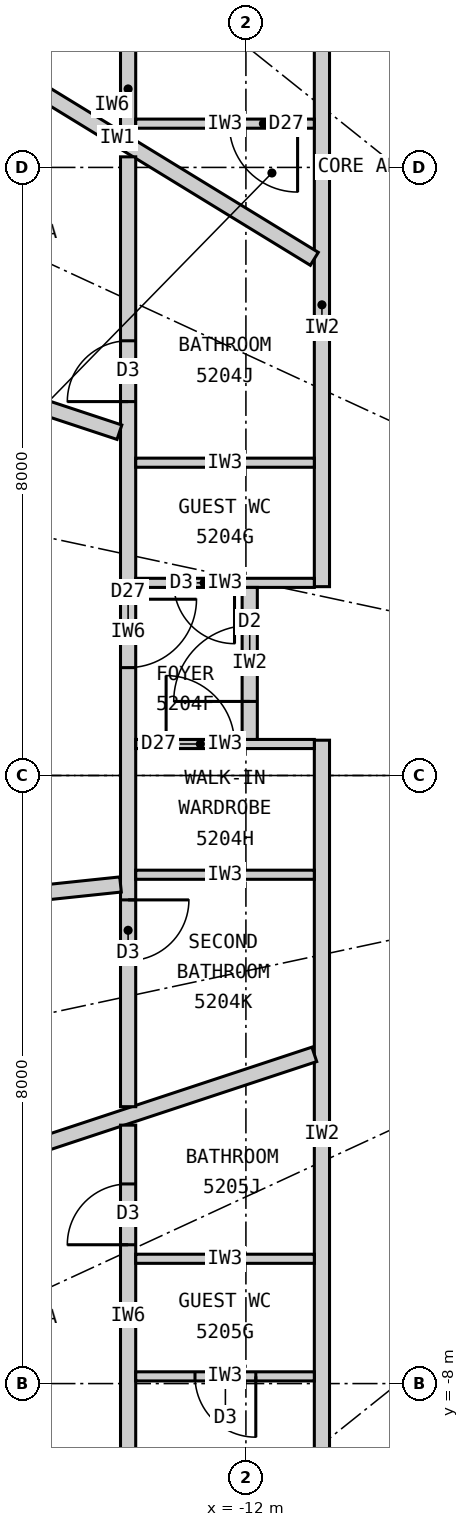
"""IFC4 building model, lengths in metres.
Left out: names, types, materials, properties, quantities, classifications, styles, units other than length and angle.
Written with IfcOpenShell. Run it as: python <this file> out.ifc"""

import sys

from ifc_helpers import new_model, si_unit, direction, frame, frame_2d, origin, place, context, subcontext, project, spatial, rectangle, extrude, element, fill, save


model = new_model("IFC4")
c1 = context("Model", 3, precision=1e-05, world=origin(), true_north=direction((0.0, 1.0)))
c2 = subcontext(c1, "Body", "Model", "MODEL_VIEW")
j1 = project(units=[si_unit("LENGTHUNIT", "METRE"), si_unit("PLANEANGLEUNIT", "RADIAN")], contexts=[c1])
p1 = place(None, origin())
s1 = spatial("IfcSite", under=j1, at=p1, CompositionType="ELEMENT")
p2 = place(p1, origin())
s2 = spatial("IfcBuilding", under=s1, at=p2, CompositionType="ELEMENT")
p3 = place(p2, frame((0.0, 0.0, 196.2)))
s3 = spatial("IfcBuildingStorey", under=s2, at=p3, CompositionType="ELEMENT", Elevation=196.2)
p4 = place(p3, frame((-11.0, 9.9, 0.0), z_axis=(0.0, 0.0, 1.0), x_axis=(0.0, -1.0, 0.0)))
e1 = element("IfcWall", 1, at=p4, inside=s3, PredefinedType="PARTITIONING", context=c2, shape_type="SweptSolid", body=[
    extrude(rectangle(XDim=7.416, YDim=0.2, at=frame_2d((3.708, 0.0))), origin(), (0.0, 0.0, 1.0), 3.12),
])
p5 = place(p3, frame((-11.0, 0.464, 0.0), z_axis=(0.0, 0.0, 1.0), x_axis=(0.0, -1.0, 0.0)))
e2 = element("IfcWall", 2, at=p5, inside=s3, PredefinedType="PARTITIONING", context=c2, shape_type="SweptSolid", body=[
    extrude(rectangle(XDim=10.364, YDim=0.2, at=frame_2d((5.182, 0.0))), origin(), (0.0, 0.0, 1.0), 3.12),
])
p6 = place(p3, frame((-11.1, 6.797, 0.0), z_axis=(0.0, 0.0, 1.0), x_axis=(-0.852799818179, 0.522237943963, 0.0)))
e3 = element("IfcWall", 3, at=p6, inside=s3, PredefinedType="PARTITIONING", context=c2, shape_type="SweptSolid", body=[
    extrude(rectangle(XDim=6.077, YDim=0.2, at=frame_2d((3.039, 0.0))), origin(), (0.0, 0.0, 1.0), 3.12),
])
p7 = place(p3, frame((-11.1, -3.669, 0.0), z_axis=(0.0, 0.0, 1.0), x_axis=(-0.949476668397, -0.313837627079, 0.0)))
e4 = element("IfcWall", 4, at=p7, inside=s3, PredefinedType="PARTITIONING", context=c2, shape_type="SweptSolid", body=[
    extrude(rectangle(XDim=8.339, YDim=0.2, at=frame_2d((4.169, 0.0))), origin(), (0.0, 0.0, 1.0), 3.12),
])
p8 = place(p3, frame((-13.55, 9.609, 0.0), z_axis=(0.0, 0.0, 1.0), x_axis=(0.0, -1.0, 0.0)))
e5 = element("IfcWall", 5, at=p8, inside=s3, PredefinedType="PARTITIONING", context=c2, shape_type="SweptSolid", body=[
    extrude(rectangle(XDim=1.153, YDim=0.2, at=frame_2d((0.576, 0.0))), origin(), (0.0, 0.0, 1.0), 3.12),
])
p9 = place(p3, frame((-11.1, 8.576, 0.0), z_axis=(0.0, 0.0, 1.0), x_axis=(-1.0, 0.0, 0.0)))
e6 = element("IfcWall", 6, at=p9, inside=s3, PredefinedType="PARTITIONING", context=c2, shape_type="SweptSolid", body=[
    extrude(rectangle(XDim=2.35, YDim=0.12, at=frame_2d((1.175, 0.0))), origin(), (0.0, 0.0, 1.0), 3.12),
])
p10 = place(p9, frame((0.22, 0.0, 0.0)))
e7 = element("IfcOpeningElement", 7, at=p10, cuts=e6, PredefinedType="OPENING", context=c2, shape_type="SweptSolid", body=[
    extrude(rectangle(XDim=0.9, YDim=2.1, at=frame_2d((0.45, 1.05))), frame((0.0, 0.07, 0.0), z_axis=(0.0, -1.0, 0.0), x_axis=(1.0, 0.0, 0.0)), (0.0, 0.0, 1.0), 0.14),
])
p11 = place(p3, frame((-13.55, 8.139, 0.0), z_axis=(0.0, 0.0, 1.0), x_axis=(0.0, -1.0, 0.0)))
e8 = element("IfcWall", 8, at=p11, inside=s3, PredefinedType="PARTITIONING", context=c2, shape_type="SweptSolid", body=[
    extrude(rectangle(XDim=12.496, YDim=0.2, at=frame_2d((6.248, 0.0))), origin(), (0.0, 0.0, 1.0), 3.12),
])
p12 = place(p11, frame((2.42, 0.0, 0.0)))
e9 = element("IfcOpeningElement", 9, at=p12, cuts=e8, PredefinedType="OPENING", context=c2, shape_type="SweptSolid", body=[
    extrude(rectangle(XDim=0.8, YDim=2.1, at=frame_2d((0.4, 1.05))), frame((0.0, 0.11, 0.0), z_axis=(0.0, -1.0, 0.0), x_axis=(1.0, 0.0, 0.0)), (0.0, 0.0, 1.0), 0.22),
])
p13 = place(p11, frame((9.776, 0.0, 0.0)))
e10 = element("IfcOpeningElement", 10, at=p13, cuts=e8, PredefinedType="OPENING", context=c2, shape_type="SweptSolid", body=[
    extrude(rectangle(XDim=0.8, YDim=2.1, at=frame_2d((0.4, 1.05))), frame((0.0, 0.11, 0.0), z_axis=(0.0, -1.0, 0.0), x_axis=(1.0, 0.0, 0.0)), (0.0, 0.0, 1.0), 0.22),
])
p14 = place(p11, frame((5.82, 0.0, 0.0)))
e11 = element("IfcOpeningElement", 11, at=p14, cuts=e8, PredefinedType="OPENING", context=c2, shape_type="SweptSolid", body=[
    extrude(rectangle(XDim=0.9, YDim=2.1, at=frame_2d((0.45, 1.05))), frame((0.0, 0.11, 0.0), z_axis=(0.0, -1.0, 0.0), x_axis=(1.0, 0.0, 0.0)), (0.0, 0.0, 1.0), 0.22),
])
p15 = place(p3, frame((-13.664, 4.516, 0.0), z_axis=(0.0, 0.0, 1.0), x_axis=(-0.949481375941, 0.313823384632, 0.0)))
e12 = element("IfcWall", 12, at=p15, inside=s3, PredefinedType="PARTITIONING", context=c2, shape_type="SweptSolid", body=[
    extrude(rectangle(XDim=5.638, YDim=0.2, at=frame_2d((2.819, 0.0))), origin(), (0.0, 0.0, 1.0), 3.12),
])
p16 = place(p15, frame((1.82, 0.0, 0.0)))
e13 = element("IfcOpeningElement", 13, at=p16, cuts=e12, PredefinedType="OPENING", context=c2, shape_type="SweptSolid", body=[
    extrude(rectangle(XDim=0.9, YDim=2.1, at=frame_2d((0.45, 1.05))), frame((0.0, 0.11, 0.0), z_axis=(0.0, -1.0, 0.0), x_axis=(1.0, 0.0, 0.0)), (0.0, 0.0, 1.0), 0.22),
])
p17 = place(p3, frame((-13.65, -1.434, 0.0), z_axis=(0.0, 0.0, 1.0), x_axis=(-0.994526954268, -0.10448031984, 0.0)))
e14 = element("IfcWall", 14, at=p17, inside=s3, PredefinedType="PARTITIONING", context=c2, shape_type="SweptSolid", body=[
    extrude(rectangle(XDim=6.837, YDim=0.2, at=frame_2d((3.418, 0.0))), origin(), (0.0, 0.0, 1.0), 2.47),
])
p18 = place(p17, frame((2.27, 0.0, 0.0)))
e15 = element("IfcOpeningElement", 15, at=p18, cuts=e14, PredefinedType="OPENING", context=c2, shape_type="SweptSolid", body=[
    extrude(rectangle(XDim=0.9, YDim=2.1, at=frame_2d((0.45, 1.05))), frame((0.0, 0.11, 0.0), z_axis=(0.0, -1.0, 0.0), x_axis=(1.0, 0.0, 0.0)), (0.0, 0.0, 1.0), 0.22),
])
p19 = place(p3, frame((-11.1, 4.115, 0.0), z_axis=(0.0, 0.0, 1.0), x_axis=(-1.0, 0.0, 0.0)))
e16 = element("IfcWall", 16, at=p19, inside=s3, PredefinedType="PARTITIONING", context=c2, shape_type="SweptSolid", body=[
    extrude(rectangle(XDim=2.35, YDim=0.12, at=frame_2d((1.175, 0.0))), origin(), (0.0, 0.0, 1.0), 3.12),
])
p20 = place(p3, frame((-11.1, 2.534, 0.0), z_axis=(0.0, 0.0, 1.0), x_axis=(-1.0, 0.0, 0.0)))
e17 = element("IfcWall", 17, at=p20, inside=s3, PredefinedType="PARTITIONING", context=c2, shape_type="SweptSolid", body=[
    extrude(rectangle(XDim=2.35, YDim=0.12, at=frame_2d((1.175, 0.0))), origin(), (0.0, 0.0, 1.0), 3.12),
])
p21 = place(p20, frame((1.05, 0.0, 0.0)))
e18 = element("IfcOpeningElement", 18, at=p21, cuts=e17, PredefinedType="OPENING", context=c2, shape_type="SweptSolid", body=[
    extrude(rectangle(XDim=0.8, YDim=2.1, at=frame_2d((0.4, 1.05))), frame((0.0, 0.07, 0.0), z_axis=(0.0, -1.0, 0.0), x_axis=(1.0, 0.0, 0.0)), (0.0, 0.0, 1.0), 0.14),
])
p22 = place(p3, frame((-11.1, 0.414, 0.0), z_axis=(0.0, 0.0, 1.0), x_axis=(-1.0, 0.0, 0.0)))
e19 = element("IfcWall", 19, at=p22, inside=s3, PredefinedType="PARTITIONING", context=c2, shape_type="SweptSolid", body=[
    extrude(rectangle(XDim=2.35, YDim=0.12, at=frame_2d((1.175, 0.0))), origin(), (0.0, 0.0, 1.0), 3.12),
])
p23 = place(p22, frame((1.05, 0.0, 0.0)))
e20 = element("IfcOpeningElement", 20, at=p23, cuts=e19, PredefinedType="OPENING", context=c2, shape_type="SweptSolid", body=[
    extrude(rectangle(XDim=0.9, YDim=2.1, at=frame_2d((0.45, 1.05))), frame((0.0, 0.07, 0.0), z_axis=(0.0, -1.0, 0.0), x_axis=(1.0, 0.0, 0.0)), (0.0, 0.0, 1.0), 0.14),
])
p24 = place(p3, frame((-11.1, -1.306, 0.0), z_axis=(0.0, 0.0, 1.0), x_axis=(-1.0, 0.0, 0.0)))
e21 = element("IfcWall", 21, at=p24, inside=s3, PredefinedType="PARTITIONING", context=c2, shape_type="SweptSolid", body=[
    extrude(rectangle(XDim=2.35, YDim=0.12, at=frame_2d((1.175, 0.0))), origin(), (0.0, 0.0, 1.0), 3.12),
])
p25 = place(p3, frame((-11.95, 2.474, 0.0), z_axis=(0.0, 0.0, 1.0), x_axis=(0.0, -1.0, 0.0)))
e22 = element("IfcWall", 22, at=p25, inside=s3, PredefinedType="PARTITIONING", context=c2, shape_type="SweptSolid", body=[
    extrude(rectangle(XDim=2.0, YDim=0.2, at=frame_2d((1.0, 0.0))), origin(), (0.0, 0.0, 1.0), 3.12),
])
p26 = place(p25, frame((0.5, 0.0, 0.0)))
e23 = element("IfcOpeningElement", 23, at=p26, cuts=e22, PredefinedType="OPENING", context=c2, shape_type="SweptSolid", body=[
    extrude(rectangle(XDim=1.0, YDim=2.2, at=frame_2d((0.5, 1.1))), frame((0.0, 0.11, 0.0), z_axis=(0.0, -1.0, 0.0), x_axis=(1.0, 0.0, 0.0)), (0.0, 0.0, 1.0), 0.22),
])
p27 = place(p3, frame((-13.55, -4.6, 0.0), z_axis=(0.0, 0.0, 1.0), x_axis=(0.0, -1.0, 0.0)))
e24 = element("IfcWall", 24, at=p27, inside=s3, PredefinedType="PARTITIONING", context=c2, shape_type="SweptSolid", body=[
    extrude(rectangle(XDim=5.009, YDim=0.2, at=frame_2d((2.504, 0.0))), origin(), (0.0, 0.0, 1.0), 3.12),
])
p28 = place(p27, frame((0.774, 0.0, 0.0)))
e25 = element("IfcOpeningElement", 25, at=p28, cuts=e24, PredefinedType="OPENING", context=c2, shape_type="SweptSolid", body=[
    extrude(rectangle(XDim=0.8, YDim=2.1, at=frame_2d((0.4, 1.05))), frame((0.0, 0.11, 0.0), z_axis=(0.0, -1.0, 0.0), x_axis=(1.0, 0.0, 0.0)), (0.0, 0.0, 1.0), 0.22),
])
p29 = place(p3, frame((-11.1, -6.358, 0.0), z_axis=(0.0, 0.0, 1.0), x_axis=(-1.0, 0.0, 0.0)))
e26 = element("IfcWall", 26, at=p29, inside=s3, PredefinedType="PARTITIONING", context=c2, shape_type="SweptSolid", body=[
    extrude(rectangle(XDim=2.35, YDim=0.12, at=frame_2d((1.175, 0.0))), origin(), (0.0, 0.0, 1.0), 3.12),
])
p30 = place(p3, frame((-11.1, -7.905, 0.0), z_axis=(0.0, 0.0, 1.0), x_axis=(-1.0, 0.0, 0.0)))
e27 = element("IfcWall", 27, at=p30, inside=s3, PredefinedType="PARTITIONING", context=c2, shape_type="SweptSolid", body=[
    extrude(rectangle(XDim=2.35, YDim=0.12, at=frame_2d((1.175, 0.0))), origin(), (0.0, 0.0, 1.0), 3.12),
])
p31 = place(p30, frame((0.77, 0.0, 0.0)))
e28 = element("IfcOpeningElement", 28, at=p31, cuts=e27, PredefinedType="OPENING", context=c2, shape_type="SweptSolid", body=[
    extrude(rectangle(XDim=0.8, YDim=2.1, at=frame_2d((0.4, 1.05))), frame((0.0, 0.07, 0.0), z_axis=(0.0, -1.0, 0.0), x_axis=(1.0, 0.0, 0.0)), (0.0, 0.0, 1.0), 0.14),
])
p32 = place(p10, origin())
e29 = element("IfcDoor", 29, at=p32, inside=s3, OperationType="SINGLE_SWING_LEFT", PredefinedType="DOOR", context=c2, shape_type="SweptSolid", body=[
    extrude(rectangle(XDim=0.9, YDim=2.1, at=frame_2d((0.45, 1.05))), frame((0.0, 0.025, 0.0), z_axis=(0.0, -1.0, 0.0), x_axis=(1.0, 0.0, 0.0)), (0.0, 0.0, 1.0), 0.05),
])
fill(e7, e29)
p33 = place(p26, origin())
e30 = element("IfcDoor", 30, at=p33, inside=s3, OperationType="SINGLE_SWING_RIGHT", PredefinedType="DOOR", context=c2, shape_type="SweptSolid", body=[
    extrude(rectangle(XDim=1.0, YDim=2.2, at=frame_2d((0.5, 1.1))), frame((0.0, 0.025, 0.0), z_axis=(0.0, -1.0, 0.0), x_axis=(1.0, 0.0, 0.0)), (0.0, 0.0, 1.0), 0.05),
])
fill(e23, e30)
p34 = place(p12, origin())
e31 = element("IfcDoor", 31, at=p34, inside=s3, OperationType="SINGLE_SWING_RIGHT", PredefinedType="DOOR", context=c2, shape_type="SweptSolid", body=[
    extrude(rectangle(XDim=0.8, YDim=2.1, at=frame_2d((0.4, 1.05))), frame((0.0, 0.025, 0.0), z_axis=(0.0, -1.0, 0.0), x_axis=(1.0, 0.0, 0.0)), (0.0, 0.0, 1.0), 0.05),
])
fill(e9, e31)
p35 = place(p21, origin())
e32 = element("IfcDoor", 32, at=p35, inside=s3, OperationType="SINGLE_SWING_LEFT", PredefinedType="DOOR", context=c2, shape_type="SweptSolid", body=[
    extrude(rectangle(XDim=0.8, YDim=2.1, at=frame_2d((0.4, 1.05))), frame((0.0, 0.025, 0.0), z_axis=(0.0, -1.0, 0.0), x_axis=(1.0, 0.0, 0.0)), (0.0, 0.0, 1.0), 0.05),
])
fill(e18, e32)
p36 = place(p23, origin())
e33 = element("IfcDoor", 33, at=p36, inside=s3, OperationType="SINGLE_SWING_RIGHT", PredefinedType="DOOR", context=c2, shape_type="SweptSolid", body=[
    extrude(rectangle(XDim=0.9, YDim=2.1, at=frame_2d((0.45, 1.05))), frame((0.0, 0.025, 0.0), z_axis=(0.0, -1.0, 0.0), x_axis=(1.0, 0.0, 0.0)), (0.0, 0.0, 1.0), 0.05),
])
fill(e20, e33)
p37 = place(p13, origin())
e34 = element("IfcDoor", 34, at=p37, inside=s3, OperationType="SINGLE_SWING_LEFT", PredefinedType="DOOR", context=c2, shape_type="SweptSolid", body=[
    extrude(rectangle(XDim=0.8, YDim=2.1, at=frame_2d((0.4, 1.05))), frame((0.0, 0.025, 0.0), z_axis=(0.0, -1.0, 0.0), x_axis=(1.0, 0.0, 0.0)), (0.0, 0.0, 1.0), 0.05),
])
fill(e10, e34)
p38 = place(p14, origin())
e35 = element("IfcDoor", 35, at=p38, inside=s3, OperationType="SINGLE_SWING_LEFT", PredefinedType="DOOR", context=c2, shape_type="SweptSolid", body=[
    extrude(rectangle(XDim=0.9, YDim=2.1, at=frame_2d((0.45, 1.05))), frame((0.0, 0.025, 0.0), z_axis=(0.0, -1.0, 0.0), x_axis=(1.0, 0.0, 0.0)), (0.0, 0.0, 1.0), 0.05),
])
fill(e11, e35)
p39 = place(p28, origin())
e36 = element("IfcDoor", 36, at=p39, inside=s3, OperationType="SINGLE_SWING_RIGHT", PredefinedType="DOOR", context=c2, shape_type="SweptSolid", body=[
    extrude(rectangle(XDim=0.8, YDim=2.1, at=frame_2d((0.4, 1.05))), frame((0.0, 0.025, 0.0), z_axis=(0.0, -1.0, 0.0), x_axis=(1.0, 0.0, 0.0)), (0.0, 0.0, 1.0), 0.05),
])
fill(e25, e36)
p40 = place(p31, origin())
e37 = element("IfcDoor", 37, at=p40, inside=s3, OperationType="SINGLE_SWING_LEFT", PredefinedType="DOOR", context=c2, shape_type="SweptSolid", body=[
    extrude(rectangle(XDim=0.8, YDim=2.1, at=frame_2d((0.4, 1.05))), frame((0.0, 0.025, 0.0), z_axis=(0.0, -1.0, 0.0), x_axis=(1.0, 0.0, 0.0)), (0.0, 0.0, 1.0), 0.05),
])
fill(e28, e37)
save(model, sys.argv[1])
